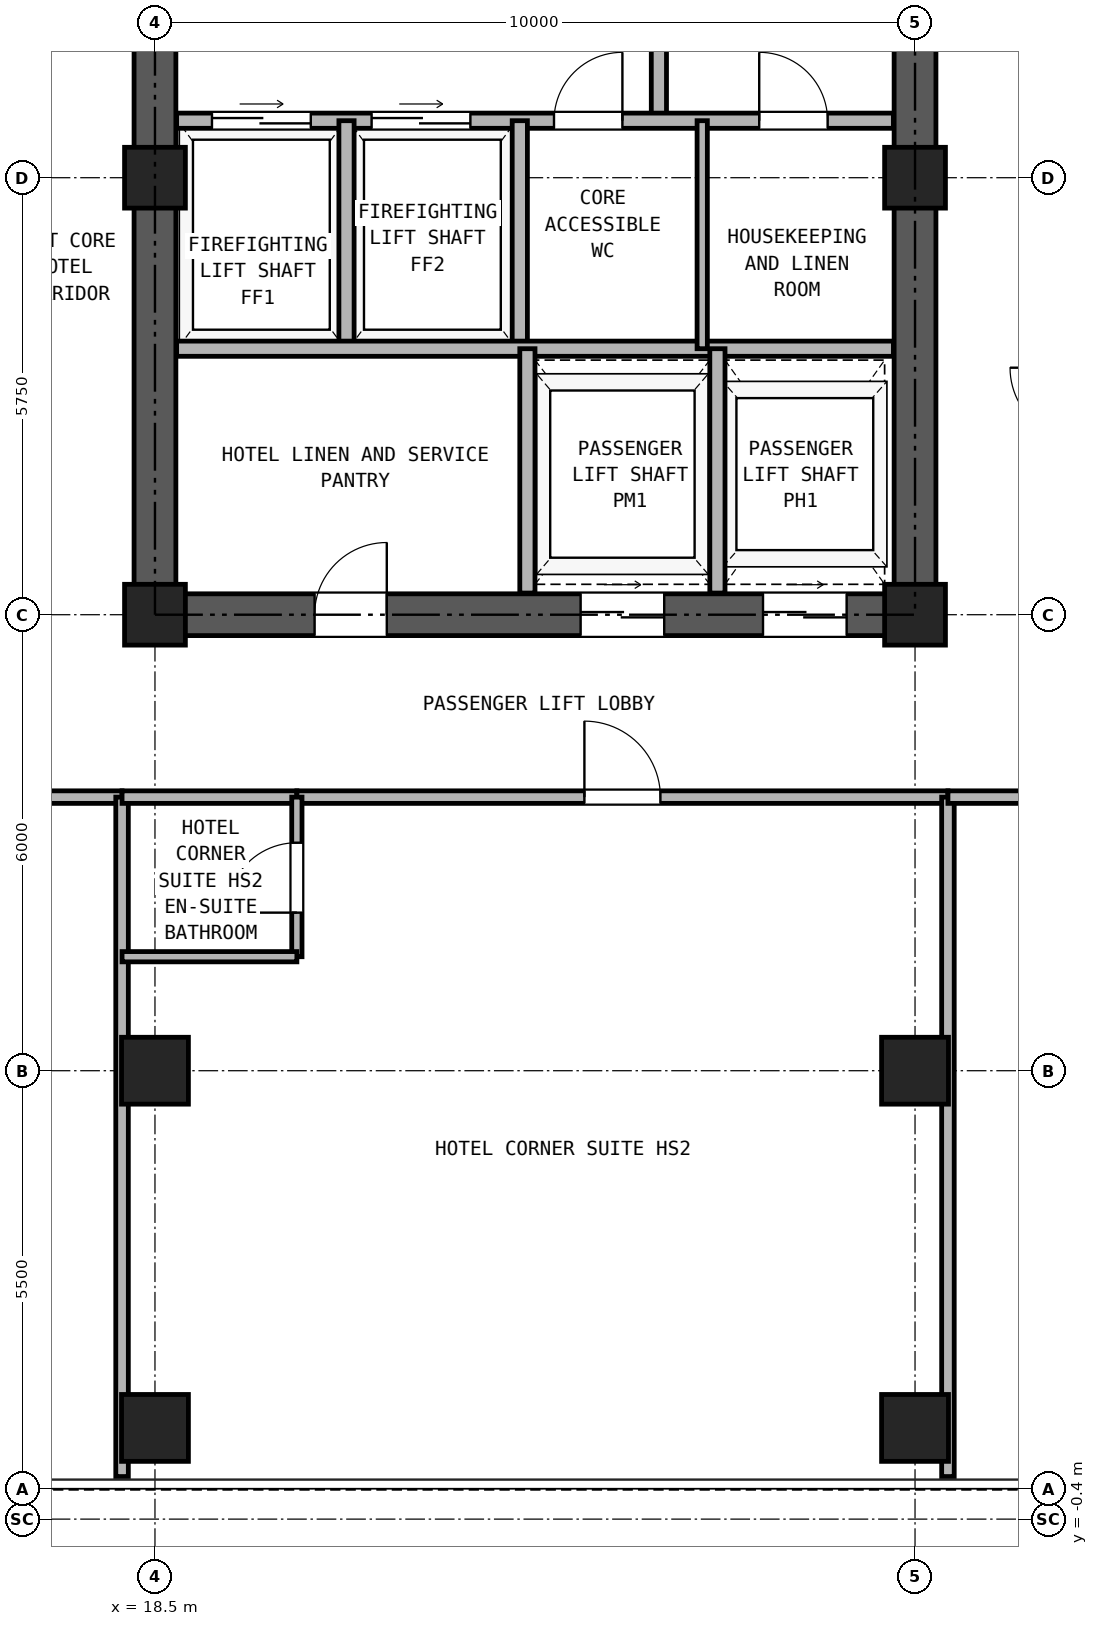
"""IFC4 building model, lengths in metres.
Left out: names, types, materials, properties, quantities, classifications, styles, units other than length and angle.
Written with IfcOpenShell. Run it as: python <this file> out.ifc"""

import sys

from ifc_helpers import new_model, si_unit, direction, frame, frame_2d, origin, origin_2d, place, context, subcontext, project, spatial, rectangle, hollow_rectangle, extrude, source, transform, mapped, element, fill, save


model = new_model("IFC4")
c1 = context("Model", 3, precision=1e-05, world=origin(), true_north=direction((0.0, 1.0)))
c2 = subcontext(c1, "Body", "Model", "MODEL_VIEW")
j1 = project(units=[si_unit("LENGTHUNIT", "METRE"), si_unit("PLANEANGLEUNIT", "RADIAN")], contexts=[c1])
p1 = place(None, origin())
s1 = spatial("IfcSite", under=j1, at=p1, CompositionType="ELEMENT")
p2 = place(p1, origin())
s2 = spatial("IfcBuilding", under=s1, at=p2, CompositionType="ELEMENT")
p3 = place(p2, frame((0.0, 0.0, 121.5)))
s3 = spatial("IfcBuildingStorey", under=s2, at=p3, CompositionType="ELEMENT", Elevation=121.5)
m1 = source(origin(), c2, "Body", "SweptSolid", [
    extrude(hollow_rectangle(XDim=0.88, YDim=0.88, WallThickness=0.05, at=origin_2d()), origin(), (0.0, 0.0, 1.0), 2.95),
])
for number, where, z_axis, x_axis in (
    (1, (18.5, 0.8, 0.0), (0.0, 0.0, 1.0), (1.0, 0.0, 0.0)),
    (2, (28.5, 0.8, 0.0), (0.0, 0.0, 1.0), (1.0, 0.0, 0.0)),
    (3, (18.5, 5.5, 0.0), (0.0, 0.0, 1.0), (1.0, 0.0, 0.0)),
):
    element("IfcColumn", number, at=place(p3, frame(where, z_axis=z_axis, x_axis=x_axis)), inside=s3, PredefinedType="COLUMN", context=c2, shape_type="MappedRepresentation", body=[
        mapped(m1, transform((0.0, 0.0, 0.0), x_axis=(1.0, 0.0, 0.0), y_axis=(0.0, 1.0, 0.0), z_axis=(0.0, 0.0, 1.0), scale=1.0)),
    ])
m2 = source(origin(), c2, "Body", "SweptSolid", [
    extrude(hollow_rectangle(XDim=0.8, YDim=0.8, WallThickness=0.045, at=origin_2d()), origin(), (0.0, 0.0, 1.0), 2.95),
])
for number, where, z_axis, x_axis in (
    (4, (18.5, 11.5, 0.0), (0.0, 0.0, 1.0), (1.0, 0.0, 0.0)),
    (5, (18.5, 17.25, 0.0), (0.0, 0.0, 1.0), (1.0, 0.0, 0.0)),
):
    element("IfcColumn", number, at=place(p3, frame(where, z_axis=z_axis, x_axis=x_axis)), inside=s3, PredefinedType="COLUMN", context=c2, shape_type="MappedRepresentation", body=[
        mapped(m2, transform((0.0, 0.0, 0.0), x_axis=(1.0, 0.0, 0.0), y_axis=(0.0, 1.0, 0.0), z_axis=(0.0, 0.0, 1.0), scale=1.0)),
    ])
p4 = place(p3, frame((28.5, 5.5, 0.0), z_axis=(0.0, 0.0, 1.0), x_axis=(1.0, 0.0, 0.0)))
e6 = element("IfcColumn", 6, at=p4, inside=s3, PredefinedType="COLUMN", context=c2, shape_type="MappedRepresentation", body=[
    mapped(m1, transform((0.0, 0.0, 0.0), x_axis=(1.0, 0.0, 0.0), y_axis=(0.0, 1.0, 0.0), z_axis=(0.0, 0.0, 1.0), scale=1.0)),
])
for number, where, z_axis, x_axis in (
    (7, (28.5, 11.5, 0.0), (0.0, 0.0, 1.0), (1.0, 0.0, 0.0)),
    (8, (28.5, 17.25, 0.0), (0.0, 0.0, 1.0), (1.0, 0.0, 0.0)),
):
    element("IfcColumn", number, at=place(p3, frame(where, z_axis=z_axis, x_axis=x_axis)), inside=s3, PredefinedType="COLUMN", context=c2, shape_type="MappedRepresentation", body=[
        mapped(m2, transform((0.0, 0.0, 0.0), x_axis=(1.0, 0.0, 0.0), y_axis=(0.0, 1.0, 0.0), z_axis=(0.0, 0.0, 1.0), scale=1.0)),
    ])
p5 = place(p3, frame((18.225, 11.5, 0.0), z_axis=(0.0, 0.0, 1.0), x_axis=(1.0, 0.0, 0.0)))
e9 = element("IfcWall", 9, at=p5, inside=s3, PredefinedType="SHEAR", context=c2, shape_type="SweptSolid", body=[
    extrude(rectangle(XDim=10.55, YDim=0.55, at=frame_2d((5.275, 0.0))), origin(), (0.0, 0.0, 1.0), 2.95),
])
p6 = place(p5, frame((2.375, 0.0, 0.0)))
e10 = element("IfcOpeningElement", 10, at=p6, cuts=e9, PredefinedType="OPENING", context=c2, shape_type="SweptSolid", body=[
    extrude(rectangle(XDim=0.95, YDim=2.15, at=frame_2d((0.475, 1.075))), frame((0.0, 0.285, 0.0), z_axis=(0.0, -1.0, 0.0), x_axis=(1.0, 0.0, 0.0)), (0.0, 0.0, 1.0), 0.57),
])
p7 = place(p5, frame((5.875, 0.0, 0.0)))
e11 = element("IfcOpeningElement", 11, at=p7, cuts=e9, PredefinedType="OPENING", context=c2, shape_type="SweptSolid", body=[
    extrude(rectangle(XDim=1.1, YDim=2.25, at=frame_2d((0.55, 1.125))), frame((0.0, 0.285, 0.0), z_axis=(0.0, -1.0, 0.0), x_axis=(1.0, 0.0, 0.0)), (0.0, 0.0, 1.0), 0.57),
])
p8 = place(p5, frame((8.275, 0.0, 0.0)))
e12 = element("IfcOpeningElement", 12, at=p8, cuts=e9, PredefinedType="OPENING", context=c2, shape_type="SweptSolid", body=[
    extrude(rectangle(XDim=1.1, YDim=2.25, at=frame_2d((0.55, 1.125))), frame((0.0, 0.285, 0.0), z_axis=(0.0, -1.0, 0.0), x_axis=(1.0, 0.0, 0.0)), (0.0, 0.0, 1.0), 0.57),
])
p9 = place(p3, frame((18.5, 11.775, 0.0), z_axis=(0.0, 0.0, 1.0), x_axis=(0.0, 1.0, 0.0)))
e13 = element("IfcWall", 13, at=p9, inside=s3, PredefinedType="SHEAR", context=c2, shape_type="SweptSolid", body=[
    extrude(rectangle(XDim=16.7, YDim=0.55, at=frame_2d((8.35, 0.0))), origin(), (0.0, 0.0, 1.0), 2.95),
])
p10 = place(p9, frame((7.375, 0.0, 0.0)))
e14 = element("IfcOpeningElement", 14, at=p10, cuts=e13, PredefinedType="OPENING", context=c2, shape_type="SweptSolid", body=[
    extrude(rectangle(XDim=1.15, YDim=2.2, at=frame_2d((0.575, 1.1))), frame((0.0, 0.285, 0.0), z_axis=(0.0, -1.0, 0.0), x_axis=(1.0, 0.0, 0.0)), (0.0, 0.0, 1.0), 0.57),
])
p11 = place(p3, frame((28.5, 11.775, 0.0), z_axis=(0.0, 0.0, 1.0), x_axis=(0.0, 1.0, 0.0)))
e15 = element("IfcWall", 15, at=p11, inside=s3, PredefinedType="SHEAR", context=c2, shape_type="SweptSolid", body=[
    extrude(rectangle(XDim=16.7, YDim=0.55, at=frame_2d((8.35, 0.0))), origin(), (0.0, 0.0, 1.0), 2.95),
])
p12 = place(p11, frame((7.375, 0.0, 0.0)))
e16 = element("IfcOpeningElement", 16, at=p12, cuts=e15, PredefinedType="OPENING", context=c2, shape_type="SweptSolid", body=[
    extrude(rectangle(XDim=1.15, YDim=2.2, at=frame_2d((0.575, 1.1))), frame((0.0, 0.285, 0.0), z_axis=(0.0, -1.0, 0.0), x_axis=(1.0, 0.0, 0.0)), (0.0, 0.0, 1.0), 0.57),
])
p13 = place(p3, frame((25.13, 18.0, 0.0), z_axis=(0.0, 0.0, 1.0), x_axis=(0.0, 1.0, 0.0)))
e17 = element("IfcWall", 17, at=p13, inside=s3, PredefinedType="PARTITIONING", context=c2, shape_type="SweptSolid", body=[
    extrude(rectangle(XDim=3.39, YDim=0.2, at=frame_2d((1.695, 0.0))), origin(), (0.0, 0.0, 1.0), 2.95),
])
p14 = place(p13, frame((1.1, 0.0, 0.0)))
e18 = element("IfcOpeningElement", 18, at=p14, cuts=e17, PredefinedType="OPENING", context=c2, shape_type="SweptSolid", body=[
    extrude(rectangle(XDim=1.15, YDim=2.2, at=frame_2d((0.575, 1.1))), frame((0.0, 0.11, 0.0), z_axis=(0.0, -1.0, 0.0), x_axis=(1.0, 0.0, 0.0)), (0.0, 0.0, 1.0), 0.22),
])
p15 = place(p3, frame((18.785, 18.0, 0.0), z_axis=(0.0, 0.0, 1.0), x_axis=(1.0, 0.0, 0.0)))
e19 = element("IfcWall", 19, at=p15, inside=s3, PredefinedType="PARTITIONING", context=c2, shape_type="SweptSolid", body=[
    extrude(rectangle(XDim=9.43, YDim=0.2, at=frame_2d((4.715, 0.0))), origin(), (0.0, 0.0, 1.0), 2.95),
])
p16 = place(p15, frame((0.465, 0.0, 0.0)))
e20 = element("IfcOpeningElement", 20, at=p16, cuts=e19, PredefinedType="OPENING", context=c2, shape_type="SweptSolid", body=[
    extrude(rectangle(XDim=1.3, YDim=2.3, at=frame_2d((0.65, 1.15))), frame((0.0, 0.11, 0.0), z_axis=(0.0, -1.0, 0.0), x_axis=(1.0, 0.0, 0.0)), (0.0, 0.0, 1.0), 0.22),
])
p17 = place(p15, frame((2.565, 0.0, 0.0)))
e21 = element("IfcOpeningElement", 21, at=p17, cuts=e19, PredefinedType="OPENING", context=c2, shape_type="SweptSolid", body=[
    extrude(rectangle(XDim=1.3, YDim=2.3, at=frame_2d((0.65, 1.15))), frame((0.0, 0.11, 0.0), z_axis=(0.0, -1.0, 0.0), x_axis=(1.0, 0.0, 0.0)), (0.0, 0.0, 1.0), 0.22),
])
p18 = place(p15, frame((4.965, 0.0, 0.0)))
e22 = element("IfcOpeningElement", 22, at=p18, cuts=e19, PredefinedType="OPENING", context=c2, shape_type="SweptSolid", body=[
    extrude(rectangle(XDim=0.9, YDim=2.05, at=frame_2d((0.45, 1.025))), frame((0.0, 0.11, 0.0), z_axis=(0.0, -1.0, 0.0), x_axis=(1.0, 0.0, 0.0)), (0.0, 0.0, 1.0), 0.22),
])
p19 = place(p15, frame((7.665, 0.0, 0.0)))
e23 = element("IfcOpeningElement", 23, at=p19, cuts=e19, PredefinedType="OPENING", context=c2, shape_type="SweptSolid", body=[
    extrude(rectangle(XDim=0.9, YDim=2.05, at=frame_2d((0.45, 1.025))), frame((0.0, 0.11, 0.0), z_axis=(0.0, -1.0, 0.0), x_axis=(1.0, 0.0, 0.0)), (0.0, 0.0, 1.0), 0.22),
])
for number, where, z_axis, x_axis in (
    (24, (21.02, 15.0, 0.0), (0.0, 0.0, 1.0), (0.0, 1.0, 0.0)),
    (25, (23.3, 15.0, 0.0), (0.0, 0.0, 1.0), (0.0, 1.0, 0.0)),
):
    element("IfcWall", number, at=place(p3, frame(where, z_axis=z_axis, x_axis=x_axis)), inside=s3, PredefinedType="PARTITIONING", context=c2, shape_type="SweptSolid", body=[
        extrude(rectangle(XDim=3.0, YDim=0.2, at=frame_2d((1.5, 0.0))), origin(), (0.0, 0.0, 1.0), 2.95),
    ])
p20 = place(p3, frame((18.785, 15.0, 0.0), z_axis=(0.0, 0.0, 1.0), x_axis=(1.0, 0.0, 0.0)))
e26 = element("IfcWall", 26, at=p20, inside=s3, PredefinedType="PARTITIONING", context=c2, shape_type="SweptSolid", body=[
    extrude(rectangle(XDim=9.43, YDim=0.2, at=frame_2d((4.715, 0.0))), origin(), (0.0, 0.0, 1.0), 2.95),
])
p21 = place(p3, frame((25.7, 15.0, 0.0), z_axis=(0.0, 0.0, 1.0), x_axis=(0.0, 1.0, 0.0)))
e27 = element("IfcWall", 27, at=p21, inside=s3, PredefinedType="PARTITIONING", context=c2, shape_type="SweptSolid", body=[
    extrude(rectangle(XDim=3.0, YDim=0.135, at=frame_2d((1.5, 0.0))), origin(), (0.0, 0.0, 1.0), 2.95),
])
for number, where, z_axis, x_axis in (
    (28, (23.4, 11.785, 0.0), (0.0, 0.0, 1.0), (0.0, 1.0, 0.0)),
    (29, (25.9, 11.785, 0.0), (0.0, 0.0, 1.0), (0.0, 1.0, 0.0)),
):
    element("IfcWall", number, at=place(p3, frame(where, z_axis=z_axis, x_axis=x_axis)), inside=s3, PredefinedType="PARTITIONING", context=c2, shape_type="SweptSolid", body=[
        extrude(rectangle(XDim=3.215, YDim=0.2, at=frame_2d((1.607, 0.0))), origin(), (0.0, 0.0, 1.0), 2.95),
    ])
p22 = place(p3, frame((9.5, 9.1, 0.0), z_axis=(0.0, 0.0, 1.0), x_axis=(1.0, 0.0, 0.0)))
e30 = element("IfcWall", 30, at=p22, inside=s3, PredefinedType="PARTITIONING", context=c2, shape_type="SweptSolid", body=[
    extrude(rectangle(XDim=8.567, YDim=0.165, at=frame_2d((4.283, 0.0))), origin(), (0.0, 0.0, 1.0), 2.95),
])
p23 = place(p22, frame((3.784, 0.0, 0.0)))
e31 = element("IfcOpeningElement", 31, at=p23, cuts=e30, PredefinedType="OPENING", context=c2, shape_type="SweptSolid", body=[
    extrude(rectangle(XDim=1.0, YDim=2.15, at=frame_2d((0.5, 1.075))), frame((0.0, 0.093, 0.0), z_axis=(0.0, -1.0, 0.0), x_axis=(1.0, 0.0, 0.0)), (0.0, 0.0, 1.0), 0.185),
])
p24 = place(p3, frame((18.067, 0.16, 0.0), z_axis=(0.0, 0.0, 1.0), x_axis=(0.0, 1.0, 0.0)))
e32 = element("IfcWall", 32, at=p24, inside=s3, PredefinedType="PARTITIONING", context=c2, shape_type="SweptSolid", body=[
    extrude(rectangle(XDim=8.94, YDim=0.165, at=frame_2d((4.47, 0.0))), origin(), (0.0, 0.0, 1.0), 2.95),
])
p25 = place(p3, frame((18.067, 9.1, 0.0), z_axis=(0.0, 0.0, 1.0), x_axis=(1.0, 0.0, 0.0)))
e33 = element("IfcWall", 33, at=p25, inside=s3, PredefinedType="PARTITIONING", context=c2, shape_type="SweptSolid", body=[
    extrude(rectangle(XDim=2.3, YDim=0.165, at=frame_2d((1.15, 0.0))), origin(), (0.0, 0.0, 1.0), 2.95),
])
p26 = place(p3, frame((20.367, 9.1, 0.0), z_axis=(0.0, 0.0, 1.0), x_axis=(1.0, 0.0, 0.0)))
e34 = element("IfcWall", 34, at=p26, inside=s3, PredefinedType="PARTITIONING", context=c2, shape_type="SweptSolid", body=[
    extrude(rectangle(XDim=8.566, YDim=0.165, at=frame_2d((4.283, 0.0))), origin(), (0.0, 0.0, 1.0), 2.95),
])
p27 = place(p26, frame((3.783, 0.0, 0.0)))
e35 = element("IfcOpeningElement", 35, at=p27, cuts=e34, PredefinedType="OPENING", context=c2, shape_type="SweptSolid", body=[
    extrude(rectangle(XDim=1.0, YDim=2.15, at=frame_2d((0.5, 1.075))), frame((0.0, 0.093, 0.0), z_axis=(0.0, -1.0, 0.0), x_axis=(1.0, 0.0, 0.0)), (0.0, 0.0, 1.0), 0.185),
])
p28 = place(p3, frame((20.367, 7.0, 0.0), z_axis=(0.0, 0.0, 1.0), x_axis=(0.0, 1.0, 0.0)))
e36 = element("IfcWall", 36, at=p28, inside=s3, PredefinedType="PARTITIONING", context=c2, shape_type="SweptSolid", body=[
    extrude(rectangle(XDim=2.1, YDim=0.135, at=frame_2d((1.05, 0.0))), origin(), (0.0, 0.0, 1.0), 2.95),
])
p29 = place(p28, frame((0.58, 0.0, 0.0)))
e37 = element("IfcOpeningElement", 37, at=p29, cuts=e36, PredefinedType="OPENING", context=c2, shape_type="SweptSolid", body=[
    extrude(rectangle(XDim=0.92, YDim=2.1, at=frame_2d((0.46, 1.05))), frame((0.0, 0.077, 0.0), z_axis=(0.0, -1.0, 0.0), x_axis=(1.0, 0.0, 0.0)), (0.0, 0.0, 1.0), 0.155),
])
p30 = place(p3, frame((18.067, 7.0, 0.0), z_axis=(0.0, 0.0, 1.0), x_axis=(1.0, 0.0, 0.0)))
e38 = element("IfcWall", 38, at=p30, inside=s3, PredefinedType="PARTITIONING", context=c2, shape_type="SweptSolid", body=[
    extrude(rectangle(XDim=2.3, YDim=0.135, at=frame_2d((1.15, 0.0))), origin(), (0.0, 0.0, 1.0), 2.95),
])
p31 = place(p3, frame((28.933, 0.16, 0.0), z_axis=(0.0, 0.0, 1.0), x_axis=(0.0, 1.0, 0.0)))
e39 = element("IfcWall", 39, at=p31, inside=s3, PredefinedType="PARTITIONING", context=c2, shape_type="SweptSolid", body=[
    extrude(rectangle(XDim=8.94, YDim=0.165, at=frame_2d((4.47, 0.0))), origin(), (0.0, 0.0, 1.0), 2.95),
])
p32 = place(p3, frame((28.933, 9.1, 0.0), z_axis=(0.0, 0.0, 1.0), x_axis=(1.0, 0.0, 0.0)))
e40 = element("IfcWall", 40, at=p32, inside=s3, PredefinedType="PARTITIONING", context=c2, shape_type="SweptSolid", body=[
    extrude(rectangle(XDim=8.567, YDim=0.165, at=frame_2d((4.283, 0.0))), origin(), (0.0, 0.0, 1.0), 2.95),
])
p33 = place(p32, frame((3.783, 0.0, 0.0)))
e41 = element("IfcOpeningElement", 41, at=p33, cuts=e40, PredefinedType="OPENING", context=c2, shape_type="SweptSolid", body=[
    extrude(rectangle(XDim=1.0, YDim=2.15, at=frame_2d((0.5, 1.075))), frame((0.0, 0.093, 0.0), z_axis=(0.0, -1.0, 0.0), x_axis=(1.0, 0.0, 0.0)), (0.0, 0.0, 1.0), 0.185),
])
p34 = place(p16, origin())
e42 = element("IfcDoor", 42, at=p34, inside=s3, OperationType="DOUBLE_DOOR_SLIDING", PredefinedType="DOOR", context=c2, shape_type="SweptSolid", body=[
    extrude(rectangle(XDim=1.3, YDim=2.3, at=frame_2d((0.65, 1.15))), frame((0.0, 0.025, 0.0), z_axis=(0.0, -1.0, 0.0), x_axis=(1.0, 0.0, 0.0)), (0.0, 0.0, 1.0), 0.05),
])
fill(e20, e42)
p35 = place(p17, origin())
e43 = element("IfcDoor", 43, at=p35, inside=s3, OperationType="DOUBLE_DOOR_SLIDING", PredefinedType="DOOR", context=c2, shape_type="SweptSolid", body=[
    extrude(rectangle(XDim=1.3, YDim=2.3, at=frame_2d((0.65, 1.15))), frame((0.0, 0.025, 0.0), z_axis=(0.0, -1.0, 0.0), x_axis=(1.0, 0.0, 0.0)), (0.0, 0.0, 1.0), 0.05),
])
fill(e21, e43)
p36 = place(p18, frame((0.9, 0.0, 0.0), z_axis=(0.0, 0.0, 1.0), x_axis=(-1.0, 0.0, 0.0)))
e44 = element("IfcDoor", 44, at=p36, inside=s3, OperationType="SINGLE_SWING_RIGHT", PredefinedType="DOOR", context=c2, shape_type="SweptSolid", body=[
    extrude(rectangle(XDim=0.9, YDim=2.05, at=frame_2d((0.45, 1.025))), frame((0.0, 0.025, 0.0), z_axis=(0.0, -1.0, 0.0), x_axis=(1.0, 0.0, 0.0)), (0.0, 0.0, 1.0), 0.05),
])
fill(e22, e44)
p37 = place(p19, frame((0.9, 0.0, 0.0), z_axis=(0.0, 0.0, 1.0), x_axis=(-1.0, 0.0, 0.0)))
e45 = element("IfcDoor", 45, at=p37, inside=s3, OperationType="SINGLE_SWING_LEFT", PredefinedType="DOOR", context=c2, shape_type="SweptSolid", body=[
    extrude(rectangle(XDim=0.9, YDim=2.05, at=frame_2d((0.45, 1.025))), frame((0.0, 0.025, 0.0), z_axis=(0.0, -1.0, 0.0), x_axis=(1.0, 0.0, 0.0)), (0.0, 0.0, 1.0), 0.05),
])
fill(e23, e45)
p38 = place(p6, frame((0.95, 0.0, 0.0), z_axis=(0.0, 0.0, 1.0), x_axis=(-1.0, 0.0, 0.0)))
e46 = element("IfcDoor", 46, at=p38, inside=s3, OperationType="SINGLE_SWING_RIGHT", PredefinedType="DOOR", context=c2, shape_type="SweptSolid", body=[
    extrude(rectangle(XDim=0.95, YDim=2.15, at=frame_2d((0.475, 1.075))), frame((0.0, 0.025, 0.0), z_axis=(0.0, -1.0, 0.0), x_axis=(1.0, 0.0, 0.0)), (0.0, 0.0, 1.0), 0.05),
])
fill(e10, e46)
p39 = place(p7, frame((1.1, 0.0, 0.0), z_axis=(0.0, 0.0, 1.0), x_axis=(-1.0, 0.0, 0.0)))
e47 = element("IfcDoor", 47, at=p39, inside=s3, OperationType="DOUBLE_DOOR_SLIDING", PredefinedType="DOOR", context=c2, shape_type="SweptSolid", body=[
    extrude(rectangle(XDim=1.1, YDim=2.25, at=frame_2d((0.55, 1.125))), frame((0.0, 0.025, 0.0), z_axis=(0.0, -1.0, 0.0), x_axis=(1.0, 0.0, 0.0)), (0.0, 0.0, 1.0), 0.05),
])
fill(e11, e47)
p40 = place(p8, frame((1.1, 0.0, 0.0), z_axis=(0.0, 0.0, 1.0), x_axis=(-1.0, 0.0, 0.0)))
e48 = element("IfcDoor", 48, at=p40, inside=s3, OperationType="DOUBLE_DOOR_SLIDING", PredefinedType="DOOR", context=c2, shape_type="SweptSolid", body=[
    extrude(rectangle(XDim=1.1, YDim=2.25, at=frame_2d((0.55, 1.125))), frame((0.0, 0.025, 0.0), z_axis=(0.0, -1.0, 0.0), x_axis=(1.0, 0.0, 0.0)), (0.0, 0.0, 1.0), 0.05),
])
fill(e12, e48)
p41 = place(p29, frame((0.92, 0.0, 0.0), z_axis=(0.0, 0.0, 1.0), x_axis=(-1.0, 0.0, 0.0)))
e49 = element("IfcDoor", 49, at=p41, inside=s3, OperationType="SINGLE_SWING_LEFT", PredefinedType="DOOR", context=c2, shape_type="SweptSolid", body=[
    extrude(rectangle(XDim=0.92, YDim=2.1, at=frame_2d((0.46, 1.05))), frame((0.0, 0.025, 0.0), z_axis=(0.0, -1.0, 0.0), x_axis=(1.0, 0.0, 0.0)), (0.0, 0.0, 1.0), 0.05),
])
fill(e37, e49)
p42 = place(p27, frame((1.0, 0.0, 0.0), z_axis=(0.0, 0.0, 1.0), x_axis=(-1.0, 0.0, 0.0)))
e50 = element("IfcDoor", 50, at=p42, inside=s3, OperationType="SINGLE_SWING_LEFT", PredefinedType="DOOR", context=c2, shape_type="SweptSolid", body=[
    extrude(rectangle(XDim=1.0, YDim=2.15, at=frame_2d((0.5, 1.075))), frame((0.0, 0.025, 0.0), z_axis=(0.0, -1.0, 0.0), x_axis=(1.0, 0.0, 0.0)), (0.0, 0.0, 1.0), 0.05),
])
fill(e35, e50)
save(model, sys.argv[1])
